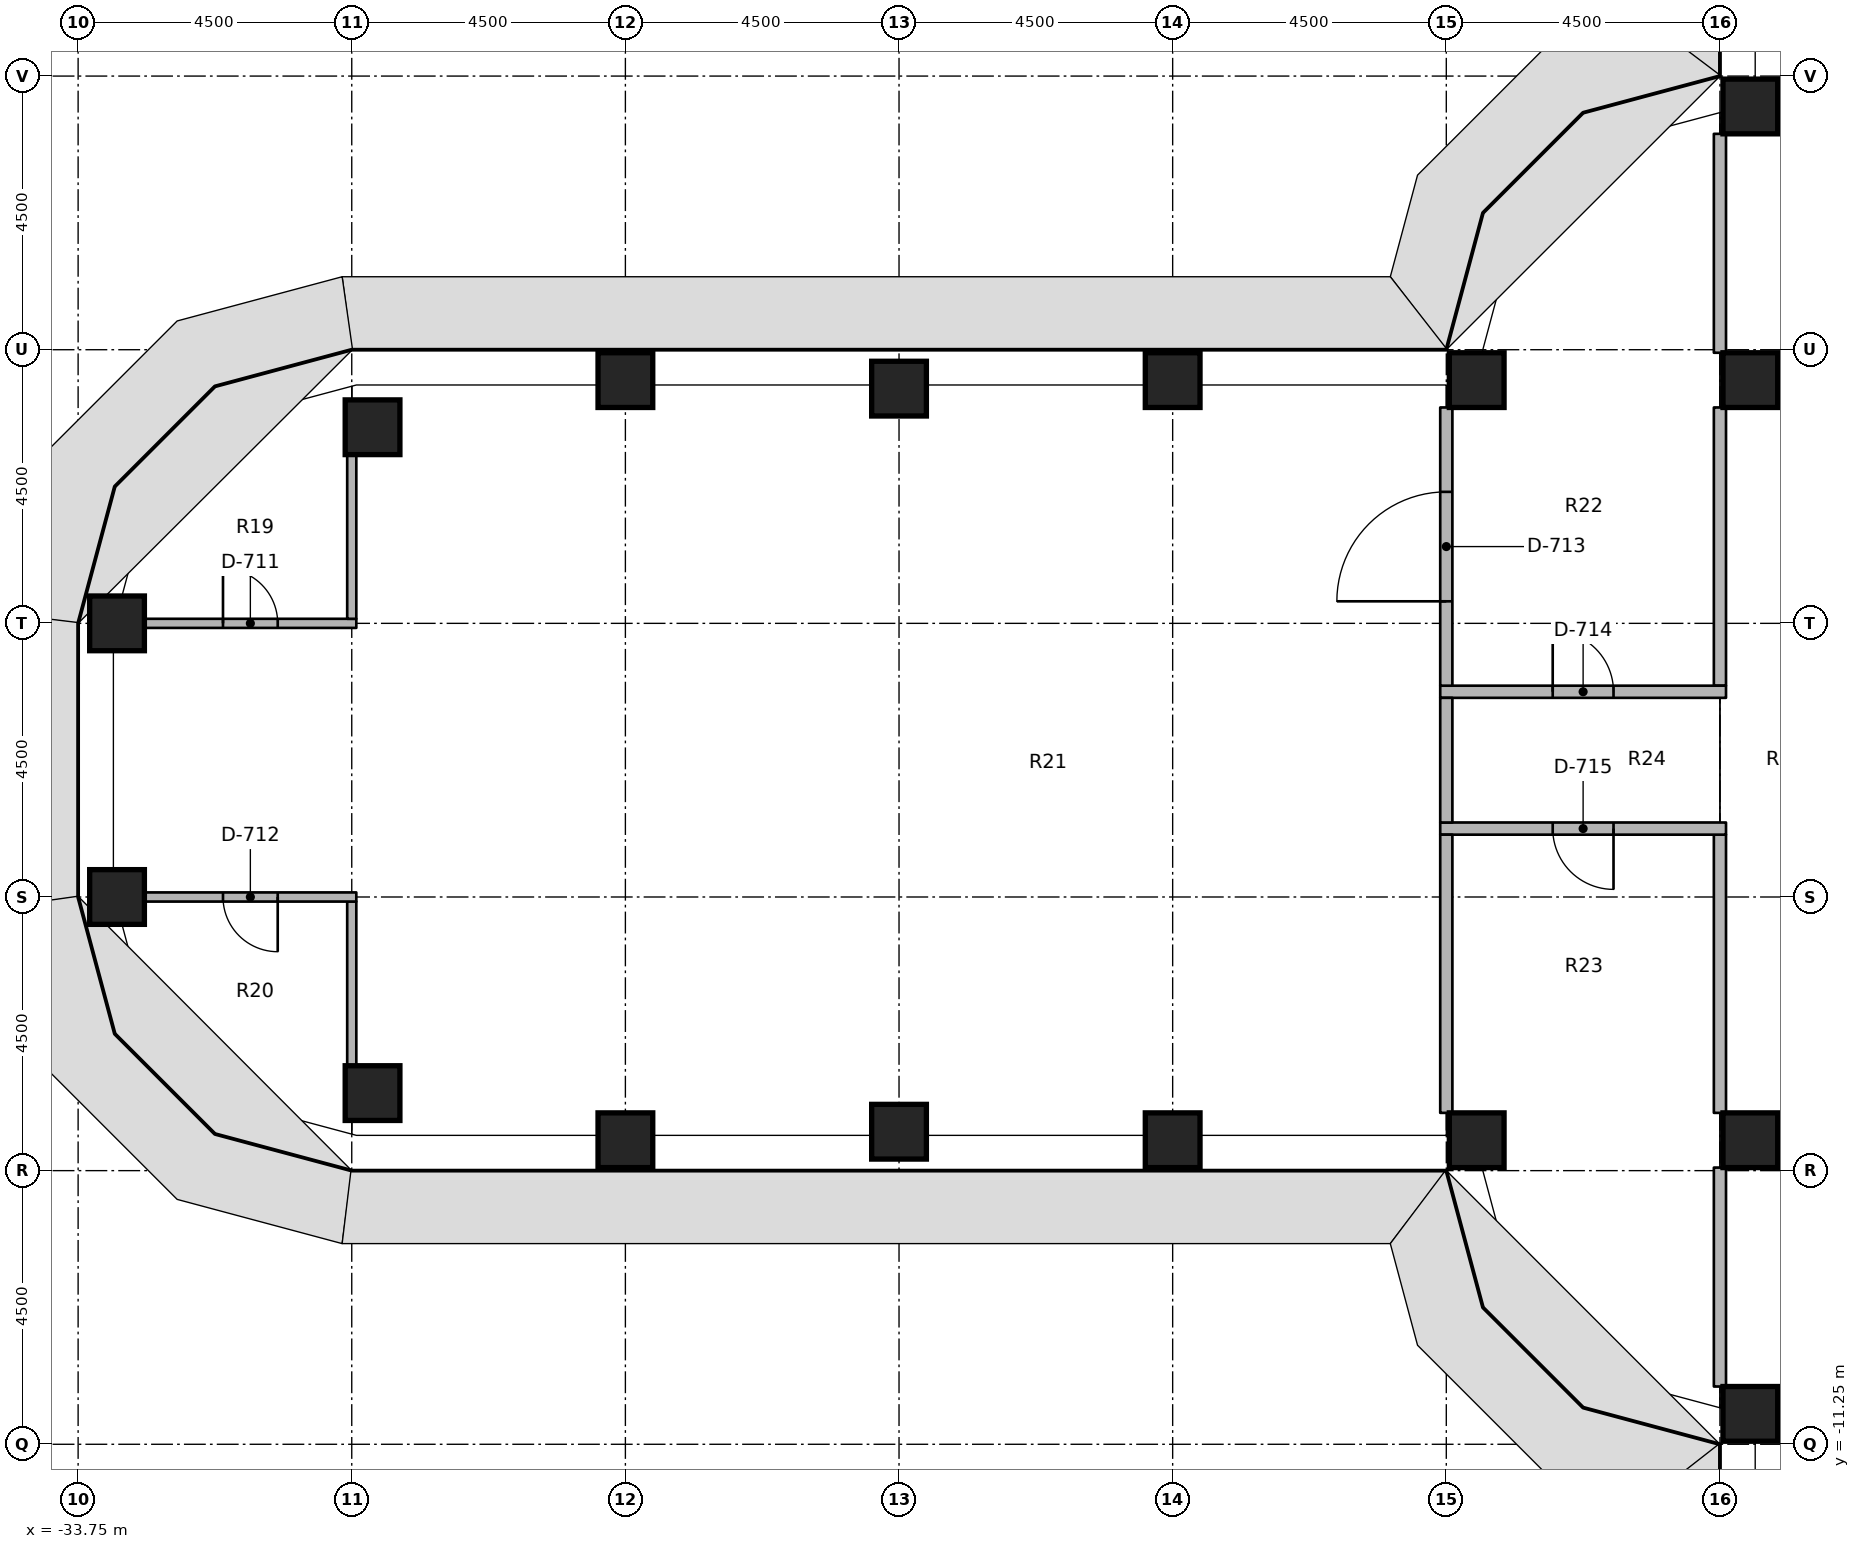
"""IFC4 building model, lengths in metres.
Left out: names, types, materials, properties, quantities, classifications, styles, units other than length and angle.
Written with IfcOpenShell. Run it as: python <this file> out.ifc"""

import sys

from ifc_helpers import new_model, si_unit, direction, frame, frame_2d, origin, origin_2d, place, context, subcontext, project, spatial, rectangle, extrude, element, fill, save


model = new_model("IFC4")
c1 = context("Model", 3, precision=1e-05, world=origin(), true_north=direction((0.0, 1.0)))
c2 = subcontext(c1, "Body", "Model", "MODEL_VIEW")
j1 = project(units=[si_unit("LENGTHUNIT", "METRE"), si_unit("PLANEANGLEUNIT", "RADIAN")], contexts=[c1])
p1 = place(None, origin())
s1 = spatial("IfcSite", under=j1, at=p1, CompositionType="ELEMENT")
p2 = place(p1, origin())
s2 = spatial("IfcBuilding", under=s1, at=p2, CompositionType="ELEMENT")
p3 = place(p2, frame((0.0, 0.0, 94.2)))
s3 = spatial("IfcBuildingStorey", under=s2, at=p3, CompositionType="ELEMENT", Elevation=94.2)
for number, where, z_axis, x_axis in (
    (1, (-33.11, -2.25, 0.0), (0.0, 0.0, 1.0), (1.0, 0.0, 0.0)),
    (2, (-33.11, 2.25, 0.0), (0.0, 0.0, 1.0), (1.0, 0.0, 0.0)),
    (3, (-28.908, -5.475, 0.0), (0.0, 0.0, 1.0), (1.0, 0.0, 0.0)),
    (4, (-28.908, 5.475, 0.0), (0.0, 0.0, 1.0), (1.0, 0.0, 0.0)),
    (5, (-24.75, -6.25, 0.0), (0.0, 0.0, 1.0), (1.0, 0.0, 0.0)),
    (6, (-24.75, 6.25, 0.0), (0.0, 0.0, 1.0), (1.0, 0.0, 0.0)),
    (7, (-20.25, -6.11, 0.0), (0.0, 0.0, 1.0), (1.0, 0.0, 0.0)),
    (8, (-20.25, 6.11, 0.0), (0.0, 0.0, 1.0), (1.0, 0.0, 0.0)),
    (9, (-15.75, -6.25, 0.0), (0.0, 0.0, 1.0), (1.0, 0.0, 0.0)),
    (10, (-15.75, 6.25, 0.0), (0.0, 0.0, 1.0), (1.0, 0.0, 0.0)),
    (11, (-10.75, -6.25, 0.0), (0.0, 0.0, 1.0), (1.0, 0.0, 0.0)),
    (12, (-10.75, 6.25, 0.0), (0.0, 0.0, 1.0), (1.0, 0.0, 0.0)),
    (13, (-6.25, -10.75, 0.0), (0.0, 0.0, 1.0), (1.0, 0.0, 0.0)),
    (14, (-6.25, -6.25, 0.0), (0.0, 0.0, 1.0), (1.0, 0.0, 0.0)),
    (15, (-6.25, 6.25, 0.0), (0.0, 0.0, 1.0), (1.0, 0.0, 0.0)),
    (16, (-6.25, 10.75, 0.0), (0.0, 0.0, 1.0), (1.0, 0.0, 0.0)),
):
    element("IfcColumn", number, at=place(p3, frame(where, z_axis=z_axis, x_axis=x_axis)), inside=s3, PredefinedType="COLUMN", context=c2, shape_type="SweptSolid", body=[
        extrude(rectangle(XDim=0.9, YDim=0.9, at=origin_2d()), origin(), (0.0, 0.0, 1.0), 3.65),
    ])
p4 = place(p3, frame((-6.75, 1.225, 0.0), z_axis=(0.0, 0.0, 1.0), x_axis=(0.0, 1.0, 0.0)))
e17 = element("IfcWall", 17, at=p4, inside=s3, PredefinedType="PARTITIONING", context=c2, shape_type="SweptSolid", body=[
    extrude(rectangle(XDim=4.575, YDim=0.2, at=frame_2d((2.288, 0.0))), origin(), (0.0, 0.0, 1.0), 2.738),
])
for number, where, z_axis, x_axis in (
    (18, (-6.75, 6.7, 0.0), (0.0, 0.0, 1.0), (0.0, 1.0, 0.0)),
    (19, (-6.75, -10.3, 0.0), (0.0, 0.0, 1.0), (0.0, 1.0, 0.0)),
):
    element("IfcWall", number, at=place(p3, frame(where, z_axis=z_axis, x_axis=x_axis)), inside=s3, PredefinedType="PARTITIONING", context=c2, shape_type="SweptSolid", body=[
        extrude(rectangle(XDim=3.6, YDim=0.2, at=frame_2d((1.8, 0.0))), origin(), (0.0, 0.0, 1.0), 2.738),
    ])
p5 = place(p3, frame((-6.75, -5.8, 0.0), z_axis=(0.0, 0.0, 1.0), x_axis=(0.0, 1.0, 0.0)))
e20 = element("IfcWall", 20, at=p5, inside=s3, PredefinedType="PARTITIONING", context=c2, shape_type="SweptSolid", body=[
    extrude(rectangle(XDim=4.575, YDim=0.2, at=frame_2d((2.288, 0.0))), origin(), (0.0, 0.0, 1.0), 2.738),
])
p6 = place(p3, frame((-11.35, 1.125, 0.0), z_axis=(0.0, 0.0, 1.0), x_axis=(1.0, 0.0, 0.0)))
e21 = element("IfcWall", 21, at=p6, inside=s3, PredefinedType="PARTITIONING", context=c2, shape_type="SweptSolid", body=[
    extrude(rectangle(XDim=4.7, YDim=0.2, at=frame_2d((2.35, 0.0))), origin(), (0.0, 0.0, 1.0), 2.738),
])
p7 = place(p6, frame((1.85, 0.0, 0.0)))
e22 = element("IfcOpeningElement", 22, at=p7, cuts=e21, PredefinedType="OPENING", context=c2, shape_type="SweptSolid", body=[
    extrude(rectangle(XDim=1.0, YDim=2.1, at=frame_2d((0.5, 1.05))), frame((0.0, 0.11, 0.0), z_axis=(0.0, -1.0, 0.0), x_axis=(1.0, 0.0, 0.0)), (0.0, 0.0, 1.0), 0.22),
])
p8 = place(p3, frame((-6.65, -1.125, 0.0), z_axis=(0.0, 0.0, 1.0), x_axis=(-1.0, 0.0, 0.0)))
e23 = element("IfcWall", 23, at=p8, inside=s3, PredefinedType="PARTITIONING", context=c2, shape_type="SweptSolid", body=[
    extrude(rectangle(XDim=4.7, YDim=0.2, at=frame_2d((2.35, 0.0))), origin(), (0.0, 0.0, 1.0), 2.738),
])
p9 = place(p8, frame((1.85, 0.0, 0.0)))
e24 = element("IfcOpeningElement", 24, at=p9, cuts=e23, PredefinedType="OPENING", context=c2, shape_type="SweptSolid", body=[
    extrude(rectangle(XDim=1.0, YDim=2.1, at=frame_2d((0.5, 1.05))), frame((0.0, 0.11, 0.0), z_axis=(0.0, -1.0, 0.0), x_axis=(1.0, 0.0, 0.0)), (0.0, 0.0, 1.0), 0.22),
])
p10 = place(p3, frame((-11.25, -1.025, 0.0), z_axis=(0.0, 0.0, 1.0), x_axis=(0.0, 1.0, 0.0)))
e25 = element("IfcWall", 25, at=p10, inside=s3, PredefinedType="PARTITIONING", context=c2, shape_type="SweptSolid", body=[
    extrude(rectangle(XDim=2.05, YDim=0.2, at=frame_2d((1.025, 0.0))), origin(), (0.0, 0.0, 1.0), 2.738),
])
p11 = place(p3, frame((-11.25, 1.225, 0.0), z_axis=(0.0, 0.0, 1.0), x_axis=(0.0, 1.0, 0.0)))
e26 = element("IfcWall", 26, at=p11, inside=s3, PredefinedType="PARTITIONING", context=c2, shape_type="SweptSolid", body=[
    extrude(rectangle(XDim=4.575, YDim=0.2, at=frame_2d((2.288, 0.0))), origin(), (0.0, 0.0, 1.0), 2.738),
])
p12 = place(p11, frame((1.387, 0.0, 0.0)))
e27 = element("IfcOpeningElement", 27, at=p12, cuts=e26, PredefinedType="OPENING", context=c2, shape_type="SweptSolid", body=[
    extrude(rectangle(XDim=1.8, YDim=2.1, at=frame_2d((0.9, 1.05))), frame((0.0, 0.11, 0.0), z_axis=(0.0, -1.0, 0.0), x_axis=(1.0, 0.0, 0.0)), (0.0, 0.0, 1.0), 0.22),
])
p13 = place(p3, frame((-11.25, -5.8, 0.0), z_axis=(0.0, 0.0, 1.0), x_axis=(0.0, 1.0, 0.0)))
e28 = element("IfcWall", 28, at=p13, inside=s3, PredefinedType="PARTITIONING", context=c2, shape_type="SweptSolid", body=[
    extrude(rectangle(XDim=4.575, YDim=0.2, at=frame_2d((2.288, 0.0))), origin(), (0.0, 0.0, 1.0), 2.738),
])
p14 = place(p3, frame((-32.66, 2.25, 0.0), z_axis=(0.0, 0.0, 1.0), x_axis=(1.0, 0.0, 0.0)))
e29 = element("IfcWall", 29, at=p14, inside=s3, PredefinedType="PARTITIONING", context=c2, shape_type="SweptSolid", body=[
    extrude(rectangle(XDim=3.485, YDim=0.15, at=frame_2d((1.742, 0.0))), origin(), (0.0, 0.0, 1.0), 2.738),
])
p15 = place(p14, frame((1.292, 0.0, 0.0)))
e30 = element("IfcOpeningElement", 30, at=p15, cuts=e29, PredefinedType="OPENING", context=c2, shape_type="SweptSolid", body=[
    extrude(rectangle(XDim=0.9, YDim=2.1, at=frame_2d((0.45, 1.05))), frame((0.0, 0.085, 0.0), z_axis=(0.0, -1.0, 0.0), x_axis=(1.0, 0.0, 0.0)), (0.0, 0.0, 1.0), 0.17),
])
for number, where, z_axis, x_axis in (
    (31, (-29.25, 2.325, 0.0), (0.0, 0.0, 1.0), (0.0, 1.0, 0.0)),
    (32, (-29.25, -5.025, 0.0), (0.0, 0.0, 1.0), (0.0, 1.0, 0.0)),
):
    element("IfcWall", number, at=place(p3, frame(where, z_axis=z_axis, x_axis=x_axis)), inside=s3, PredefinedType="PARTITIONING", context=c2, shape_type="SweptSolid", body=[
        extrude(rectangle(XDim=2.7, YDim=0.15, at=frame_2d((1.35, 0.0))), origin(), (0.0, 0.0, 1.0), 2.738),
    ])
p16 = place(p3, frame((-29.175, -2.25, 0.0), z_axis=(0.0, 0.0, 1.0), x_axis=(-1.0, 0.0, 0.0)))
e33 = element("IfcWall", 33, at=p16, inside=s3, PredefinedType="PARTITIONING", context=c2, shape_type="SweptSolid", body=[
    extrude(rectangle(XDim=3.485, YDim=0.15, at=frame_2d((1.742, 0.0))), origin(), (0.0, 0.0, 1.0), 2.738),
])
p17 = place(p16, frame((1.292, 0.0, 0.0)))
e34 = element("IfcOpeningElement", 34, at=p17, cuts=e33, PredefinedType="OPENING", context=c2, shape_type="SweptSolid", body=[
    extrude(rectangle(XDim=0.9, YDim=2.1, at=frame_2d((0.45, 1.05))), frame((0.0, 0.085, 0.0), z_axis=(0.0, -1.0, 0.0), x_axis=(1.0, 0.0, 0.0)), (0.0, 0.0, 1.0), 0.17),
])
p18 = place(p15, origin())
e35 = element("IfcDoor", 35, at=p18, inside=s3, OperationType="SINGLE_SWING_RIGHT", PredefinedType="DOOR", context=c2, shape_type="SweptSolid", body=[
    extrude(rectangle(XDim=0.9, YDim=2.1, at=frame_2d((0.45, 1.05))), frame((0.0, 0.025, 0.0), z_axis=(0.0, -1.0, 0.0), x_axis=(1.0, 0.0, 0.0)), (0.0, 0.0, 1.0), 0.05),
])
fill(e30, e35)
p19 = place(p17, origin())
e36 = element("IfcDoor", 36, at=p19, inside=s3, OperationType="SINGLE_SWING_LEFT", PredefinedType="DOOR", context=c2, shape_type="SweptSolid", body=[
    extrude(rectangle(XDim=0.9, YDim=2.1, at=frame_2d((0.45, 1.05))), frame((0.0, 0.025, 0.0), z_axis=(0.0, -1.0, 0.0), x_axis=(1.0, 0.0, 0.0)), (0.0, 0.0, 1.0), 0.05),
])
fill(e34, e36)
p20 = place(p12, origin())
e37 = element("IfcDoor", 37, at=p20, inside=s3, OperationType="DOUBLE_DOOR_SINGLE_SWING", PredefinedType="DOOR", context=c2, shape_type="SweptSolid", body=[
    extrude(rectangle(XDim=1.8, YDim=2.1, at=frame_2d((0.9, 1.05))), frame((0.0, 0.025, 0.0), z_axis=(0.0, -1.0, 0.0), x_axis=(1.0, 0.0, 0.0)), (0.0, 0.0, 1.0), 0.05),
])
fill(e27, e37)
p21 = place(p7, origin())
e38 = element("IfcDoor", 38, at=p21, inside=s3, OperationType="SINGLE_SWING_RIGHT", PredefinedType="DOOR", context=c2, shape_type="SweptSolid", body=[
    extrude(rectangle(XDim=1.0, YDim=2.1, at=frame_2d((0.5, 1.05))), frame((0.0, 0.025, 0.0), z_axis=(0.0, -1.0, 0.0), x_axis=(1.0, 0.0, 0.0)), (0.0, 0.0, 1.0), 0.05),
])
fill(e22, e38)
p22 = place(p9, origin())
e39 = element("IfcDoor", 39, at=p22, inside=s3, OperationType="SINGLE_SWING_RIGHT", PredefinedType="DOOR", context=c2, shape_type="SweptSolid", body=[
    extrude(rectangle(XDim=1.0, YDim=2.1, at=frame_2d((0.5, 1.05))), frame((0.0, 0.025, 0.0), z_axis=(0.0, -1.0, 0.0), x_axis=(1.0, 0.0, 0.0)), (0.0, 0.0, 1.0), 0.05),
])
fill(e24, e39)
save(model, sys.argv[1])
